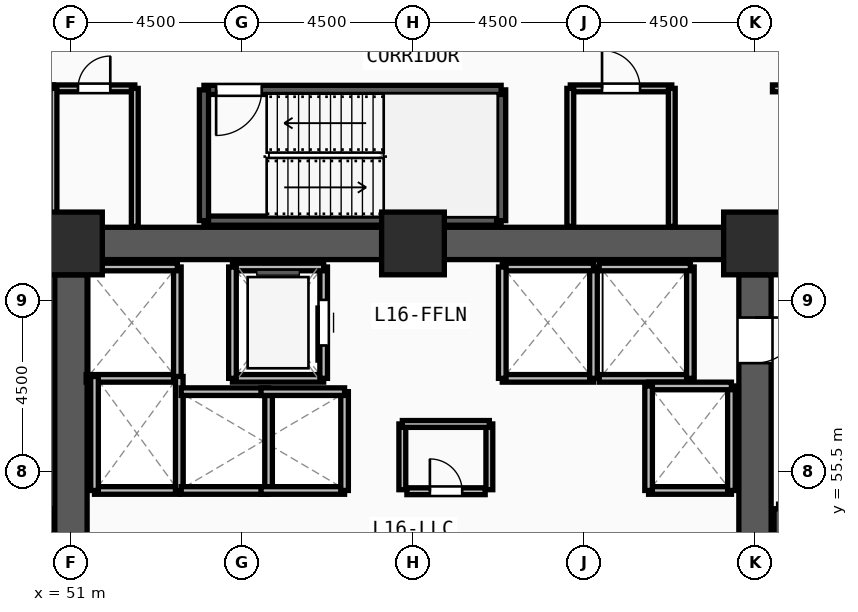
"""IFC4 building model, lengths in metres.
Left out: names, types, materials, properties, quantities, classifications, styles, units other than length and angle.
Written with IfcOpenShell. Run it as: python <this file> out.ifc"""

import sys

from ifc_helpers import new_model, si_unit, direction, frame, frame_2d, origin, origin_2d, place, context, subcontext, project, spatial, rectangle, extrude, source, transform, mapped, element, fill, save


model = new_model("IFC4")
c1 = context("Model", 3, precision=1e-05, world=origin(), true_north=direction((0.0, 1.0)))
c2 = subcontext(c1, "Body", "Model", "MODEL_VIEW")
j1 = project(units=[si_unit("LENGTHUNIT", "METRE"), si_unit("PLANEANGLEUNIT", "RADIAN")], contexts=[c1])
p1 = place(None, origin())
s1 = spatial("IfcSite", under=j1, at=p1, CompositionType="ELEMENT")
p2 = place(p1, origin())
s2 = spatial("IfcBuilding", under=s1, at=p2, CompositionType="ELEMENT")
p3 = place(p2, frame((0.0, 0.0, 63.0)))
s3 = spatial("IfcBuildingStorey", under=s2, at=p3, CompositionType="ELEMENT", Elevation=63.0)
m1 = source(origin(), c2, "Body", "SweptSolid", [
    extrude(rectangle(XDim=1.65, YDim=1.65, at=origin_2d()), origin(), (0.0, 0.0, 1.0), 3.75),
])
for number, where, z_axis, x_axis in (
    (1, (69.0, 61.5, 0.0), (0.0, 0.0, 1.0), (1.0, 0.0, 0.0)),
    (2, (60.0, 61.5, 0.0), (0.0, 0.0, 1.0), (1.0, 0.0, 0.0)),
    (3, (51.0, 61.5, 0.0), (0.0, 0.0, 1.0), (1.0, 0.0, 0.0)),
):
    element("IfcColumn", number, at=place(p3, frame(where, z_axis=z_axis, x_axis=x_axis)), inside=s3, PredefinedType="COLUMN", context=c2, shape_type="MappedRepresentation", body=[
        mapped(m1, transform((0.0, 0.0, 0.0), x_axis=(1.0, 0.0, 0.0), y_axis=(0.0, 1.0, 0.0), z_axis=(0.0, 0.0, 1.0), scale=1.0)),
    ])
for number, where, z_axis, x_axis in (
    (4, (51.825, 61.5, 0.0), (0.0, 0.0, 1.0), (1.0, 0.0, 0.0)),
    (5, (60.825, 61.5, 0.0), (0.0, 0.0, 1.0), (1.0, 0.0, 0.0)),
):
    element("IfcWall", number, at=place(p3, frame(where, z_axis=z_axis, x_axis=x_axis)), inside=s3, PredefinedType="SHEAR", context=c2, shape_type="SweptSolid", body=[
        extrude(rectangle(XDim=7.35, YDim=0.85, at=frame_2d((3.675, 0.0))), origin(), (0.0, 0.0, 1.0), 3.57),
    ])
p4 = place(p3, frame((69.0, 60.675, 0.0), z_axis=(0.0, 0.0, 1.0), x_axis=(0.0, -1.0, 0.0)))
e6 = element("IfcWall", 6, at=p4, inside=s3, PredefinedType="SHEAR", context=c2, shape_type="SweptSolid", body=[
    extrude(rectangle(XDim=13.35, YDim=0.85, at=frame_2d((6.675, 0.0))), origin(), (0.0, 0.0, 1.0), 3.57),
])
m2 = source(origin(), c2, "Body", "SweptSolid", [
    extrude(rectangle(XDim=1.2, YDim=2.2, at=frame_2d((0.6, 1.1))), frame((0.0, 0.435, 0.0), z_axis=(0.0, -1.0, 0.0), x_axis=(1.0, 0.0, 0.0)), (0.0, 0.0, 1.0), 0.87),
])
p5 = place(p4, frame((1.125, 0.0, 0.0)))
e7 = element("IfcOpeningElement", 7, at=p5, cuts=e6, PredefinedType="OPENING", context=c2, shape_type="MappedRepresentation", body=[
    mapped(m2, transform((0.0, 0.0, 0.0), x_axis=(1.0, 0.0, 0.0), y_axis=(0.0, 1.0, 0.0), z_axis=(0.0, 0.0, 1.0), scale=1.0)),
])
p6 = place(p3, frame((51.0, 47.325, 0.0), z_axis=(0.0, 0.0, 1.0), x_axis=(0.0, 1.0, 0.0)))
e8 = element("IfcWall", 8, at=p6, inside=s3, PredefinedType="SHEAR", context=c2, shape_type="SweptSolid", body=[
    extrude(rectangle(XDim=13.35, YDim=0.85, at=frame_2d((6.675, 0.0))), origin(), (0.0, 0.0, 1.0), 3.57),
])
for number, where, z_axis, x_axis in (
    (9, (69.62, 54.52, 0.0), (0.0, 0.0, 1.0), (0.0, -1.0, 0.0)),
    (10, (54.5, 62.1, 0.0), (0.0, 0.0, 1.0), (1.0, 0.0, 0.0)),
):
    element("IfcWall", number, at=place(p3, frame(where, z_axis=z_axis, x_axis=x_axis)), inside=s3, PredefinedType="SOLIDWALL", context=c2, shape_type="SweptSolid", body=[
        extrude(rectangle(XDim=7.82, YDim=0.24, at=frame_2d((3.91, 0.0))), origin(), (0.0, 0.0, 1.0), 3.57),
    ])
p7 = place(p3, frame((62.32, 62.1, 0.0), z_axis=(0.0, 0.0, 1.0), x_axis=(0.0, 1.0, 0.0)))
e11 = element("IfcWall", 11, at=p7, inside=s3, PredefinedType="SOLIDWALL", context=c2, shape_type="SweptSolid", body=[
    extrude(rectangle(XDim=3.44, YDim=0.24, at=frame_2d((1.72, 0.0))), origin(), (0.0, 0.0, 1.0), 3.57),
])
p8 = place(p3, frame((62.32, 65.54, 0.0), z_axis=(0.0, 0.0, 1.0), x_axis=(-1.0, 0.0, 0.0)))
e12 = element("IfcWall", 12, at=p8, inside=s3, PredefinedType="SOLIDWALL", context=c2, shape_type="SweptSolid", body=[
    extrude(rectangle(XDim=7.82, YDim=0.24, at=frame_2d((3.91, 0.0))), origin(), (0.0, 0.0, 1.0), 3.57),
])
m3 = source(origin(), c2, "Body", "SweptSolid", [
    extrude(rectangle(XDim=1.2, YDim=2.2, at=frame_2d((0.6, 1.1))), frame((0.0, 0.13, 0.0), z_axis=(0.0, -1.0, 0.0), x_axis=(1.0, 0.0, 0.0)), (0.0, 0.0, 1.0), 0.26),
])
p9 = place(p8, frame((6.3, 0.0, 0.0)))
e13 = element("IfcOpeningElement", 13, at=p9, cuts=e12, PredefinedType="OPENING", context=c2, shape_type="MappedRepresentation", body=[
    mapped(m3, transform((0.0, 0.0, 0.0), x_axis=(1.0, 0.0, 0.0), y_axis=(0.0, 1.0, 0.0), z_axis=(0.0, 0.0, 1.0), scale=1.0)),
])
p10 = place(p3, frame((54.5, 65.54, 0.0), z_axis=(0.0, 0.0, 1.0), x_axis=(0.0, -1.0, 0.0)))
e14 = element("IfcWall", 14, at=p10, inside=s3, PredefinedType="SOLIDWALL", context=c2, shape_type="SweptSolid", body=[
    extrude(rectangle(XDim=3.44, YDim=0.24, at=frame_2d((1.72, 0.0))), origin(), (0.0, 0.0, 1.0), 3.57),
])
p11 = place(p3, frame((55.25, 57.95, 0.0), z_axis=(0.0, 0.0, 1.0), x_axis=(1.0, 0.0, 0.0)))
e15 = element("IfcWall", 15, at=p11, inside=s3, PredefinedType="SOLIDWALL", context=c2, shape_type="SweptSolid", body=[
    extrude(rectangle(XDim=2.4, YDim=0.2, at=frame_2d((1.2, 0.0))), origin(), (0.0, 0.0, 1.0), 3.57),
])
p12 = place(p3, frame((57.65, 57.95, 0.0), z_axis=(0.0, 0.0, 1.0), x_axis=(0.0, 1.0, 0.0)))
e16 = element("IfcWall", 16, at=p12, inside=s3, PredefinedType="SOLIDWALL", context=c2, shape_type="SweptSolid", body=[
    extrude(rectangle(XDim=2.93, YDim=0.2, at=frame_2d((1.465, 0.0))), origin(), (0.0, 0.0, 1.0), 3.57),
])
m4 = source(origin(), c2, "Body", "SweptSolid", [
    extrude(rectangle(XDim=1.2, YDim=2.3, at=frame_2d((0.6, 1.15))), frame((0.0, 0.11, 0.0), z_axis=(0.0, -1.0, 0.0), x_axis=(1.0, 0.0, 0.0)), (0.0, 0.0, 1.0), 0.22),
])
p13 = place(p12, frame((0.865, 0.0, 0.0)))
e17 = element("IfcOpeningElement", 17, at=p13, cuts=e16, PredefinedType="OPENING", context=c2, shape_type="MappedRepresentation", body=[
    mapped(m4, transform((0.0, 0.0, 0.0), x_axis=(1.0, 0.0, 0.0), y_axis=(0.0, 1.0, 0.0), z_axis=(0.0, 0.0, 1.0), scale=1.0)),
])
p14 = place(p3, frame((57.65, 60.88, 0.0), z_axis=(0.0, 0.0, 1.0), x_axis=(-1.0, 0.0, 0.0)))
e18 = element("IfcWall", 18, at=p14, inside=s3, PredefinedType="SOLIDWALL", context=c2, shape_type="SweptSolid", body=[
    extrude(rectangle(XDim=2.4, YDim=0.2, at=frame_2d((1.2, 0.0))), origin(), (0.0, 0.0, 1.0), 3.57),
])
p15 = place(p3, frame((55.25, 60.88, 0.0), z_axis=(0.0, 0.0, 1.0), x_axis=(0.0, -1.0, 0.0)))
e19 = element("IfcWall", 19, at=p15, inside=s3, PredefinedType="SOLIDWALL", context=c2, shape_type="SweptSolid", body=[
    extrude(rectangle(XDim=2.93, YDim=0.2, at=frame_2d((1.465, 0.0))), origin(), (0.0, 0.0, 1.0), 3.57),
])
p16 = place(p3, frame((62.35, 57.95, 0.0), z_axis=(0.0, 0.0, 1.0), x_axis=(1.0, 0.0, 0.0)))
e20 = element("IfcWall", 20, at=p16, inside=s3, PredefinedType="SOLIDWALL", context=c2, shape_type="SweptSolid", body=[
    extrude(rectangle(XDim=2.4, YDim=0.2, at=frame_2d((1.2, 0.0))), origin(), (0.0, 0.0, 1.0), 3.57),
])
p17 = place(p3, frame((64.75, 57.95, 0.0), z_axis=(0.0, 0.0, 1.0), x_axis=(0.0, 1.0, 0.0)))
e21 = element("IfcWall", 21, at=p17, inside=s3, PredefinedType="SOLIDWALL", context=c2, shape_type="SweptSolid", body=[
    extrude(rectangle(XDim=2.93, YDim=0.2, at=frame_2d((1.465, 0.0))), origin(), (0.0, 0.0, 1.0), 3.57),
])
p18 = place(p3, frame((64.75, 60.88, 0.0), z_axis=(0.0, 0.0, 1.0), x_axis=(-1.0, 0.0, 0.0)))
e22 = element("IfcWall", 22, at=p18, inside=s3, PredefinedType="SOLIDWALL", context=c2, shape_type="SweptSolid", body=[
    extrude(rectangle(XDim=2.4, YDim=0.2, at=frame_2d((1.2, 0.0))), origin(), (0.0, 0.0, 1.0), 3.57),
])
p19 = place(p3, frame((62.35, 60.88, 0.0), z_axis=(0.0, 0.0, 1.0), x_axis=(0.0, -1.0, 0.0)))
e23 = element("IfcWall", 23, at=p19, inside=s3, PredefinedType="SOLIDWALL", context=c2, shape_type="SweptSolid", body=[
    extrude(rectangle(XDim=2.93, YDim=0.2, at=frame_2d((1.465, 0.0))), origin(), (0.0, 0.0, 1.0), 3.57),
])
p20 = place(p3, frame((64.9, 57.95, 0.0), z_axis=(0.0, 0.0, 1.0), x_axis=(1.0, 0.0, 0.0)))
e24 = element("IfcWall", 24, at=p20, inside=s3, PredefinedType="SOLIDWALL", context=c2, shape_type="SweptSolid", body=[
    extrude(rectangle(XDim=2.4, YDim=0.2, at=frame_2d((1.2, 0.0))), origin(), (0.0, 0.0, 1.0), 3.57),
])
p21 = place(p3, frame((67.3, 57.95, 0.0), z_axis=(0.0, 0.0, 1.0), x_axis=(0.0, 1.0, 0.0)))
e25 = element("IfcWall", 25, at=p21, inside=s3, PredefinedType="SOLIDWALL", context=c2, shape_type="SweptSolid", body=[
    extrude(rectangle(XDim=2.93, YDim=0.2, at=frame_2d((1.465, 0.0))), origin(), (0.0, 0.0, 1.0), 3.57),
])
for number, where, z_axis, x_axis in (
    (26, (67.3, 60.88, 0.0), (0.0, 0.0, 1.0), (-1.0, 0.0, 0.0)),
    (27, (51.4, 57.95, 0.0), (0.0, 0.0, 1.0), (1.0, 0.0, 0.0)),
):
    element("IfcWall", number, at=place(p3, frame(where, z_axis=z_axis, x_axis=x_axis)), inside=s3, PredefinedType="SOLIDWALL", context=c2, shape_type="SweptSolid", body=[
        extrude(rectangle(XDim=2.4, YDim=0.2, at=frame_2d((1.2, 0.0))), origin(), (0.0, 0.0, 1.0), 3.57),
    ])
p22 = place(p3, frame((53.8, 57.95, 0.0), z_axis=(0.0, 0.0, 1.0), x_axis=(0.0, 1.0, 0.0)))
e28 = element("IfcWall", 28, at=p22, inside=s3, PredefinedType="SOLIDWALL", context=c2, shape_type="SweptSolid", body=[
    extrude(rectangle(XDim=2.93, YDim=0.2, at=frame_2d((1.465, 0.0))), origin(), (0.0, 0.0, 1.0), 3.57),
])
p23 = place(p3, frame((53.8, 60.88, 0.0), z_axis=(0.0, 0.0, 1.0), x_axis=(-1.0, 0.0, 0.0)))
e29 = element("IfcWall", 29, at=p23, inside=s3, PredefinedType="SOLIDWALL", context=c2, shape_type="SweptSolid", body=[
    extrude(rectangle(XDim=2.4, YDim=0.2, at=frame_2d((1.2, 0.0))), origin(), (0.0, 0.0, 1.0), 3.57),
])
p24 = place(p3, frame((51.62, 55.0, 0.0), z_axis=(0.0, 0.0, 1.0), x_axis=(1.0, 0.0, 0.0)))
e30 = element("IfcWall", 30, at=p24, inside=s3, PredefinedType="SOLIDWALL", context=c2, shape_type="SweptSolid", body=[
    extrude(rectangle(XDim=2.23, YDim=0.2, at=frame_2d((1.115, 0.0))), origin(), (0.0, 0.0, 1.0), 3.57),
])
for number, where, z_axis, x_axis in (
    (31, (53.85, 55.0, 0.0), (0.0, 0.0, 1.0), (0.0, 1.0, 0.0)),
    (32, (51.62, 58.0, 0.0), (0.0, 0.0, 1.0), (0.0, -1.0, 0.0)),
):
    element("IfcWall", number, at=place(p3, frame(where, z_axis=z_axis, x_axis=x_axis)), inside=s3, PredefinedType="SOLIDWALL", context=c2, shape_type="SweptSolid", body=[
        extrude(rectangle(XDim=3.0, YDim=0.2, at=frame_2d((1.5, 0.0))), origin(), (0.0, 0.0, 1.0), 3.57),
    ])
p25 = place(p3, frame((66.2, 55.0, 0.0), z_axis=(0.0, 0.0, 1.0), x_axis=(1.0, 0.0, 0.0)))
e33 = element("IfcWall", 33, at=p25, inside=s3, PredefinedType="SOLIDWALL", context=c2, shape_type="SweptSolid", body=[
    extrude(rectangle(XDim=2.18, YDim=0.2, at=frame_2d((1.09, 0.0))), origin(), (0.0, 0.0, 1.0), 3.57),
])
p26 = place(p3, frame((68.38, 55.0, 0.0), z_axis=(0.0, 0.0, 1.0), x_axis=(0.0, 1.0, 0.0)))
e34 = element("IfcWall", 34, at=p26, inside=s3, PredefinedType="SOLIDWALL", context=c2, shape_type="SweptSolid", body=[
    extrude(rectangle(XDim=2.75, YDim=0.2, at=frame_2d((1.375, 0.0))), origin(), (0.0, 0.0, 1.0), 3.57),
])
p27 = place(p3, frame((68.38, 57.75, 0.0), z_axis=(0.0, 0.0, 1.0), x_axis=(-1.0, 0.0, 0.0)))
e35 = element("IfcWall", 35, at=p27, inside=s3, PredefinedType="SOLIDWALL", context=c2, shape_type="SweptSolid", body=[
    extrude(rectangle(XDim=2.18, YDim=0.2, at=frame_2d((1.09, 0.0))), origin(), (0.0, 0.0, 1.0), 3.57),
])
p28 = place(p3, frame((66.2, 57.75, 0.0), z_axis=(0.0, 0.0, 1.0), x_axis=(0.0, -1.0, 0.0)))
e36 = element("IfcWall", 36, at=p28, inside=s3, PredefinedType="SOLIDWALL", context=c2, shape_type="SweptSolid", body=[
    extrude(rectangle(XDim=2.75, YDim=0.2, at=frame_2d((1.375, 0.0))), origin(), (0.0, 0.0, 1.0), 3.57),
])
p29 = place(p3, frame((53.9, 55.0, 0.0), z_axis=(0.0, 0.0, 1.0), x_axis=(1.0, 0.0, 0.0)))
e37 = element("IfcWall", 37, at=p29, inside=s3, PredefinedType="SOLIDWALL", context=c2, shape_type="SweptSolid", body=[
    extrude(rectangle(XDim=2.3, YDim=0.2, at=frame_2d((1.15, 0.0))), origin(), (0.0, 0.0, 1.0), 3.57),
])
p30 = place(p3, frame((56.2, 55.0, 0.0), z_axis=(0.0, 0.0, 1.0), x_axis=(0.0, 1.0, 0.0)))
e38 = element("IfcWall", 38, at=p30, inside=s3, PredefinedType="SOLIDWALL", context=c2, shape_type="SweptSolid", body=[
    extrude(rectangle(XDim=2.6, YDim=0.2, at=frame_2d((1.3, 0.0))), origin(), (0.0, 0.0, 1.0), 3.57),
])
p31 = place(p3, frame((56.2, 57.6, 0.0), z_axis=(0.0, 0.0, 1.0), x_axis=(-1.0, 0.0, 0.0)))
e39 = element("IfcWall", 39, at=p31, inside=s3, PredefinedType="SOLIDWALL", context=c2, shape_type="SweptSolid", body=[
    extrude(rectangle(XDim=2.3, YDim=0.2, at=frame_2d((1.15, 0.0))), origin(), (0.0, 0.0, 1.0), 3.57),
])
p32 = place(p3, frame((56.0, 55.0, 0.0), z_axis=(0.0, 0.0, 1.0), x_axis=(1.0, 0.0, 0.0)))
e40 = element("IfcWall", 40, at=p32, inside=s3, PredefinedType="SOLIDWALL", context=c2, shape_type="SweptSolid", body=[
    extrude(rectangle(XDim=2.2, YDim=0.2, at=frame_2d((1.1, 0.0))), origin(), (0.0, 0.0, 1.0), 3.57),
])
p33 = place(p3, frame((58.2, 55.0, 0.0), z_axis=(0.0, 0.0, 1.0), x_axis=(0.0, 1.0, 0.0)))
e41 = element("IfcWall", 41, at=p33, inside=s3, PredefinedType="SOLIDWALL", context=c2, shape_type="SweptSolid", body=[
    extrude(rectangle(XDim=2.6, YDim=0.2, at=frame_2d((1.3, 0.0))), origin(), (0.0, 0.0, 1.0), 3.57),
])
p34 = place(p3, frame((58.2, 57.6, 0.0), z_axis=(0.0, 0.0, 1.0), x_axis=(-1.0, 0.0, 0.0)))
e42 = element("IfcWall", 42, at=p34, inside=s3, PredefinedType="SOLIDWALL", context=c2, shape_type="SweptSolid", body=[
    extrude(rectangle(XDim=2.2, YDim=0.2, at=frame_2d((1.1, 0.0))), origin(), (0.0, 0.0, 1.0), 3.57),
])
p35 = place(p3, frame((59.84, 54.98, 0.0), z_axis=(0.0, 0.0, 1.0), x_axis=(1.0, 0.0, 0.0)))
e43 = element("IfcWall", 43, at=p35, inside=s3, PredefinedType="PARTITIONING", context=c2, shape_type="SweptSolid", body=[
    extrude(rectangle(XDim=2.06, YDim=0.18, at=frame_2d((1.03, 0.0))), origin(), (0.0, 0.0, 1.0), 3.57),
])
m5 = source(origin(), c2, "Body", "SweptSolid", [
    extrude(rectangle(XDim=0.85, YDim=2.1, at=frame_2d((0.425, 1.05))), frame((0.0, 0.1, 0.0), z_axis=(0.0, -1.0, 0.0), x_axis=(1.0, 0.0, 0.0)), (0.0, 0.0, 1.0), 0.2),
])
p36 = place(p35, frame((0.605, 0.0, 0.0)))
e44 = element("IfcOpeningElement", 44, at=p36, cuts=e43, PredefinedType="OPENING", context=c2, shape_type="MappedRepresentation", body=[
    mapped(m5, transform((0.0, 0.0, 0.0), x_axis=(1.0, 0.0, 0.0), y_axis=(0.0, 1.0, 0.0), z_axis=(0.0, 0.0, 1.0), scale=1.0)),
])
p37 = place(p3, frame((50.54, 65.58, 0.0), z_axis=(0.0, 0.0, 1.0), x_axis=(1.0, 0.0, 0.0)))
e45 = element("IfcWall", 45, at=p37, inside=s3, PredefinedType="PARTITIONING", context=c2, shape_type="SweptSolid", body=[
    extrude(rectangle(XDim=2.14, YDim=0.18, at=frame_2d((1.07, 0.0))), origin(), (0.0, 0.0, 1.0), 3.57),
])
p38 = place(p37, frame((0.645, 0.0, 0.0)))
e46 = element("IfcOpeningElement", 46, at=p38, cuts=e45, PredefinedType="OPENING", context=c2, shape_type="MappedRepresentation", body=[
    mapped(m5, transform((0.0, 0.0, 0.0), x_axis=(1.0, 0.0, 0.0), y_axis=(0.0, 1.0, 0.0), z_axis=(0.0, 0.0, 1.0), scale=1.0)),
])
p39 = place(p3, frame((64.14, 65.58, 0.0), z_axis=(0.0, 0.0, 1.0), x_axis=(1.0, 0.0, 0.0)))
e47 = element("IfcWall", 47, at=p39, inside=s3, PredefinedType="PARTITIONING", context=c2, shape_type="SweptSolid", body=[
    extrude(rectangle(XDim=2.67, YDim=0.18, at=frame_2d((1.335, 0.0))), origin(), (0.0, 0.0, 1.0), 3.57),
])
m6 = source(origin(), c2, "Body", "SweptSolid", [
    extrude(rectangle(XDim=1.0, YDim=2.2, at=frame_2d((0.5, 1.1))), frame((0.0, 0.1, 0.0), z_axis=(0.0, -1.0, 0.0), x_axis=(1.0, 0.0, 0.0)), (0.0, 0.0, 1.0), 0.2),
])
p40 = place(p39, frame((0.835, 0.0, 0.0)))
e48 = element("IfcOpeningElement", 48, at=p40, cuts=e47, PredefinedType="OPENING", context=c2, shape_type="MappedRepresentation", body=[
    mapped(m6, transform((0.0, 0.0, 0.0), x_axis=(1.0, 0.0, 0.0), y_axis=(0.0, 1.0, 0.0), z_axis=(0.0, 0.0, 1.0), scale=1.0)),
])
p41 = place(p3, frame((46.7, 65.58, 0.0), z_axis=(0.0, 0.0, 1.0), x_axis=(1.0, 0.0, 0.0)))
e49 = element("IfcWall", 49, at=p41, inside=s3, PredefinedType="PARTITIONING", context=c2, shape_type="SweptSolid", body=[
    extrude(rectangle(XDim=3.84, YDim=0.18, at=frame_2d((1.92, 0.0))), origin(), (0.0, 0.0, 1.0), 3.57),
])
m7 = source(origin(), c2, "Body", "SweptSolid", [
    extrude(rectangle(XDim=1.3, YDim=2.2, at=frame_2d((0.65, 1.1))), frame((0.0, 0.1, 0.0), z_axis=(0.0, -1.0, 0.0), x_axis=(1.0, 0.0, 0.0)), (0.0, 0.0, 1.0), 0.2),
])
p42 = place(p41, frame((1.27, 0.0, 0.0)))
e50 = element("IfcOpeningElement", 50, at=p42, cuts=e49, PredefinedType="OPENING", context=c2, shape_type="MappedRepresentation", body=[
    mapped(m7, transform((0.0, 0.0, 0.0), x_axis=(1.0, 0.0, 0.0), y_axis=(0.0, 1.0, 0.0), z_axis=(0.0, 0.0, 1.0), scale=1.0)),
])
p43 = place(p3, frame((69.46, 65.58, 0.0), z_axis=(0.0, 0.0, 1.0), x_axis=(1.0, 0.0, 0.0)))
e51 = element("IfcWall", 51, at=p43, inside=s3, PredefinedType="PARTITIONING", context=c2, shape_type="SweptSolid", body=[
    extrude(rectangle(XDim=3.84, YDim=0.18, at=frame_2d((1.92, 0.0))), origin(), (0.0, 0.0, 1.0), 3.57),
])
p44 = place(p43, frame((1.27, 0.0, 0.0)))
e52 = element("IfcOpeningElement", 52, at=p44, cuts=e51, PredefinedType="OPENING", context=c2, shape_type="MappedRepresentation", body=[
    mapped(m7, transform((0.0, 0.0, 0.0), x_axis=(1.0, 0.0, 0.0), y_axis=(0.0, 1.0, 0.0), z_axis=(0.0, 0.0, 1.0), scale=1.0)),
])
for number, where, z_axis, x_axis in (
    (53, (59.72, 55.02, 0.0), (0.0, 0.0, 1.0), (0.0, 1.0, 0.0)),
    (54, (62.01, 55.02, 0.0), (0.0, 0.0, 1.0), (0.0, 1.0, 0.0)),
):
    element("IfcWall", number, at=place(p3, frame(where, z_axis=z_axis, x_axis=x_axis)), inside=s3, PredefinedType="PARTITIONING", context=c2, shape_type="SweptSolid", body=[
        extrude(rectangle(XDim=1.73, YDim=0.18, at=frame_2d((0.865, 0.0))), origin(), (0.0, 0.0, 1.0), 3.57),
    ])
p45 = place(p3, frame((59.72, 56.75, 0.0), z_axis=(0.0, 0.0, 1.0), x_axis=(1.0, 0.0, 0.0)))
e55 = element("IfcWall", 55, at=p45, inside=s3, PredefinedType="PARTITIONING", context=c2, shape_type="SweptSolid", body=[
    extrude(rectangle(XDim=2.29, YDim=0.18, at=frame_2d((1.145, 0.0))), origin(), (0.0, 0.0, 1.0), 3.57),
])
for number, where, z_axis, x_axis in (
    (56, (50.54, 61.95, 0.0), (0.0, 0.0, 1.0), (0.0, 1.0, 0.0)),
    (57, (52.68, 61.95, 0.0), (0.0, 0.0, 1.0), (0.0, 1.0, 0.0)),
    (58, (64.14, 61.95, 0.0), (0.0, 0.0, 1.0), (0.0, 1.0, 0.0)),
    (59, (66.81, 61.95, 0.0), (0.0, 0.0, 1.0), (0.0, 1.0, 0.0)),
):
    element("IfcWall", number, at=place(p3, frame(where, z_axis=z_axis, x_axis=x_axis)), inside=s3, PredefinedType="PARTITIONING", context=c2, shape_type="SweptSolid", body=[
        extrude(rectangle(XDim=3.63, YDim=0.18, at=frame_2d((1.815, 0.0))), origin(), (0.0, 0.0, 1.0), 3.57),
    ])
m8 = source(origin(), c2, "Body", "SweptSolid", [
    extrude(rectangle(XDim=1.2, YDim=2.2, at=frame_2d((0.6, 1.1))), frame((0.0, 0.025, 0.0), z_axis=(0.0, -1.0, 0.0), x_axis=(1.0, 0.0, 0.0)), (0.0, 0.0, 1.0), 0.05),
])
p46 = place(p5, origin())
e60 = element("IfcDoor", 60, at=p46, inside=s3, OperationType="SINGLE_SWING_LEFT", PredefinedType="DOOR", context=c2, shape_type="MappedRepresentation", body=[
    mapped(m8, transform((0.0, 0.0, 0.0), x_axis=(1.0, 0.0, 0.0), y_axis=(0.0, 1.0, 0.0), z_axis=(0.0, 0.0, 1.0), scale=1.0)),
])
fill(e7, e60)
p47 = place(p9, origin())
e61 = element("IfcDoor", 61, at=p47, inside=s3, OperationType="SINGLE_SWING_RIGHT", PredefinedType="DOOR", context=c2, shape_type="MappedRepresentation", body=[
    mapped(m8, transform((0.0, 0.0, 0.0), x_axis=(1.0, 0.0, 0.0), y_axis=(0.0, 1.0, 0.0), z_axis=(0.0, 0.0, 1.0), scale=1.0)),
])
fill(e13, e61)
m9 = source(origin(), c2, "Body", "SweptSolid", [
    extrude(rectangle(XDim=1.2, YDim=2.3, at=frame_2d((0.6, 1.15))), frame((0.0, 0.025, 0.0), z_axis=(0.0, -1.0, 0.0), x_axis=(1.0, 0.0, 0.0)), (0.0, 0.0, 1.0), 0.05),
])
p48 = place(p13, origin())
e62 = element("IfcDoor", 62, at=p48, inside=s3, OperationType="SLIDING_TO_LEFT", PredefinedType="DOOR", context=c2, shape_type="MappedRepresentation", body=[
    mapped(m9, transform((0.0, 0.0, 0.0), x_axis=(1.0, 0.0, 0.0), y_axis=(0.0, 1.0, 0.0), z_axis=(0.0, 0.0, 1.0), scale=1.0)),
])
fill(e17, e62)
m10 = source(origin(), c2, "Body", "SweptSolid", [
    extrude(rectangle(XDim=0.85, YDim=2.1, at=frame_2d((0.425, 1.05))), frame((0.0, 0.025, 0.0), z_axis=(0.0, -1.0, 0.0), x_axis=(1.0, 0.0, 0.0)), (0.0, 0.0, 1.0), 0.05),
])
p49 = place(p36, origin())
e63 = element("IfcDoor", 63, at=p49, inside=s3, OperationType="SINGLE_SWING_LEFT", PredefinedType="DOOR", context=c2, shape_type="MappedRepresentation", body=[
    mapped(m10, transform((0.0, 0.0, 0.0), x_axis=(1.0, 0.0, 0.0), y_axis=(0.0, 1.0, 0.0), z_axis=(0.0, 0.0, 1.0), scale=1.0)),
])
fill(e44, e63)
p50 = place(p38, origin())
e64 = element("IfcDoor", 64, at=p50, inside=s3, OperationType="SINGLE_SWING_RIGHT", PredefinedType="DOOR", context=c2, shape_type="MappedRepresentation", body=[
    mapped(m10, transform((0.0, 0.0, 0.0), x_axis=(1.0, 0.0, 0.0), y_axis=(0.0, 1.0, 0.0), z_axis=(0.0, 0.0, 1.0), scale=1.0)),
])
fill(e46, e64)
m11 = source(origin(), c2, "Body", "SweptSolid", [
    extrude(rectangle(XDim=1.0, YDim=2.2, at=frame_2d((0.5, 1.1))), frame((0.0, 0.025, 0.0), z_axis=(0.0, -1.0, 0.0), x_axis=(1.0, 0.0, 0.0)), (0.0, 0.0, 1.0), 0.05),
])
p51 = place(p40, origin())
e65 = element("IfcDoor", 65, at=p51, inside=s3, OperationType="SINGLE_SWING_LEFT", PredefinedType="DOOR", context=c2, shape_type="MappedRepresentation", body=[
    mapped(m11, transform((0.0, 0.0, 0.0), x_axis=(1.0, 0.0, 0.0), y_axis=(0.0, 1.0, 0.0), z_axis=(0.0, 0.0, 1.0), scale=1.0)),
])
fill(e48, e65)
save(model, sys.argv[1])
